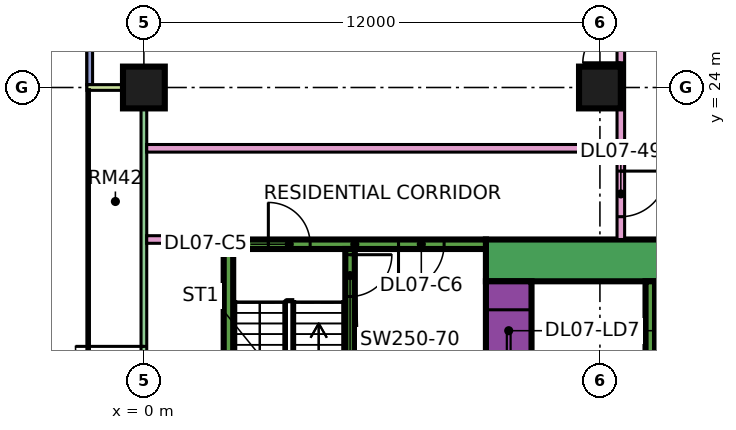
"""IFC4 building model, lengths in metres.
Left out: names, types, materials, properties, quantities, classifications, styles, units other than length and angle.
Written with IfcOpenShell. Run it as: python <this file> out.ifc"""

import sys

from ifc_helpers import new_model, si_unit, direction, frame, frame_2d, origin, origin_2d, place, context, subcontext, project, spatial, rectangle, extrude, element, fill, save


model = new_model("IFC4")
c1 = context("Model", 3, precision=1e-05, world=origin(), true_north=direction((0.0, 1.0)))
c2 = subcontext(c1, "Body", "Model", "MODEL_VIEW")
j1 = project(units=[si_unit("LENGTHUNIT", "METRE"), si_unit("PLANEANGLEUNIT", "RADIAN")], contexts=[c1])
p1 = place(None, origin())
s1 = spatial("IfcSite", under=j1, at=p1, CompositionType="ELEMENT")
p2 = place(p1, origin())
s2 = spatial("IfcBuilding", under=s1, at=p2, CompositionType="ELEMENT")
p3 = place(p2, frame((0.0, 0.0, 41.4)))
s3 = spatial("IfcBuildingStorey", under=s2, at=p3, CompositionType="ELEMENT", Elevation=41.4)
for number, where, z_axis, x_axis in (
    (1, (0.0, 24.0, 0.0), (0.0, 0.0, 1.0), (1.0, 0.0, 0.0)),
    (2, (12.0, 24.0, 0.0), (0.0, 0.0, 1.0), (1.0, 0.0, 0.0)),
):
    element("IfcColumn", number, at=place(p3, frame(where, z_axis=z_axis, x_axis=x_axis)), inside=s3, PredefinedType="COLUMN", context=c2, shape_type="SweptSolid", body=[
        extrude(rectangle(XDim=1.1, YDim=1.1, at=origin_2d()), origin(), (0.0, 0.0, 1.0), 3.75),
    ])
p4 = place(p3, frame((9.0, 19.45, 0.0), z_axis=(0.0, 0.0, 1.0), x_axis=(1.0, 0.0, 0.0)))
e3 = element("IfcWall", 3, at=p4, inside=s3, PredefinedType="SHEAR", context=c2, shape_type="SweptSolid", body=[
    extrude(rectangle(XDim=25.0, YDim=1.1, at=frame_2d((12.5, 0.0))), origin(), (0.0, 0.0, 1.0), 3.75),
])
p5 = place(p4, frame((19.1, 0.0, 0.0)))
e4 = element("IfcOpeningElement", 4, at=p5, cuts=e3, PredefinedType="OPENING", context=c2, shape_type="SweptSolid", body=[
    extrude(rectangle(XDim=1.8, YDim=2.4, at=frame_2d((0.9, 1.2))), frame((0.0, 0.56, 0.0), z_axis=(0.0, -1.0, 0.0), x_axis=(1.0, 0.0, 0.0)), (0.0, 0.0, 1.0), 1.12),
])
p6 = place(p3, frame((9.6, 8.1, 0.0), z_axis=(0.0, 0.0, 1.0), x_axis=(0.0, 1.0, 0.0)))
e5 = element("IfcWall", 5, at=p6, inside=s3, PredefinedType="SHEAR", context=c2, shape_type="SweptSolid", body=[
    extrude(rectangle(XDim=10.8, YDim=1.2, at=frame_2d((5.4, 0.0))), origin(), (0.0, 0.0, 1.0), 3.75),
])
p7 = place(p6, frame((3.775, 0.0, 0.0)))
e6 = element("IfcOpeningElement", 6, at=p7, cuts=e5, PredefinedType="OPENING", context=c2, shape_type="SweptSolid", body=[
    extrude(rectangle(XDim=1.1, YDim=2.2, at=frame_2d((0.55, 1.1))), frame((0.0, 0.61, 0.0), z_axis=(0.0, -1.0, 0.0), x_axis=(1.0, 0.0, 0.0)), (0.0, 0.0, 1.0), 1.22),
])
p8 = place(p6, frame((6.275, 0.0, 0.0)))
e7 = element("IfcOpeningElement", 7, at=p8, cuts=e5, PredefinedType="OPENING", context=c2, shape_type="SweptSolid", body=[
    extrude(rectangle(XDim=1.1, YDim=2.2, at=frame_2d((0.55, 1.1))), frame((0.0, 0.61, 0.0), z_axis=(0.0, -1.0, 0.0), x_axis=(1.0, 0.0, 0.0)), (0.0, 0.0, 1.0), 1.22),
])
p9 = place(p6, frame((8.95, 0.0, 0.0)))
e8 = element("IfcOpeningElement", 8, at=p9, cuts=e5, PredefinedType="OPENING", context=c2, shape_type="SweptSolid", body=[
    extrude(rectangle(XDim=1.1, YDim=2.2, at=frame_2d((0.55, 1.1))), frame((0.0, 0.61, 0.0), z_axis=(0.0, -1.0, 0.0), x_axis=(1.0, 0.0, 0.0)), (0.0, 0.0, 1.0), 1.22),
])
p10 = place(p6, frame((1.45, 0.0, 0.0)))
e9 = element("IfcOpeningElement", 9, at=p10, cuts=e5, PredefinedType="OPENING", context=c2, shape_type="SweptSolid", body=[
    extrude(rectangle(XDim=0.9, YDim=2.1, at=frame_2d((0.45, 1.05))), frame((0.0, 0.61, 0.0), z_axis=(0.0, -1.0, 0.0), x_axis=(1.0, 0.0, 0.0)), (0.0, 0.0, 1.0), 1.22),
])
p11 = place(p3, frame((13.325, 8.1, 0.0), z_axis=(0.0, 0.0, 1.0), x_axis=(0.0, 1.0, 0.0)))
e10 = element("IfcWall", 10, at=p11, inside=s3, PredefinedType="SHEAR", context=c2, shape_type="SweptSolid", body=[
    extrude(rectangle(XDim=10.8, YDim=0.25, at=frame_2d((5.4, 0.0))), origin(), (0.0, 0.0, 1.0), 3.75),
])
p12 = place(p3, frame((2.1, 19.875, 0.0), z_axis=(0.0, 0.0, 1.0), x_axis=(1.0, 0.0, 0.0)))
e11 = element("IfcWall", 11, at=p12, inside=s3, PredefinedType="SHEAR", context=c2, shape_type="SweptSolid", body=[
    extrude(rectangle(XDim=6.9, YDim=0.25, at=frame_2d((3.45, 0.0))), origin(), (0.0, 0.0, 1.0), 3.75),
])
p13 = place(p12, frame((1.175, 0.0, 0.0)))
e12 = element("IfcOpeningElement", 12, at=p13, cuts=e11, PredefinedType="OPENING", context=c2, shape_type="SweptSolid", body=[
    extrude(rectangle(XDim=1.1, YDim=2.2, at=frame_2d((0.55, 1.1))), frame((0.0, 0.135, 0.0), z_axis=(0.0, -1.0, 0.0), x_axis=(1.0, 0.0, 0.0)), (0.0, 0.0, 1.0), 0.27),
])
p14 = place(p12, frame((4.6, 0.0, 0.0)))
e13 = element("IfcOpeningElement", 13, at=p14, cuts=e11, PredefinedType="OPENING", context=c2, shape_type="SweptSolid", body=[
    extrude(rectangle(XDim=1.2, YDim=2.2, at=frame_2d((0.6, 1.1))), frame((0.0, 0.135, 0.0), z_axis=(0.0, -1.0, 0.0), x_axis=(1.0, 0.0, 0.0)), (0.0, 0.0, 1.0), 0.27),
])
p15 = place(p3, frame((2.225, 13.25, 0.0), z_axis=(0.0, 0.0, 1.0), x_axis=(0.0, 1.0, 0.0)))
e14 = element("IfcWall", 14, at=p15, inside=s3, PredefinedType="SHEAR", context=c2, shape_type="SweptSolid", body=[
    extrude(rectangle(XDim=6.5, YDim=0.25, at=frame_2d((3.25, 0.0))), origin(), (0.0, 0.0, 1.0), 3.75),
])
p16 = place(p3, frame((5.425, 13.25, 0.0), z_axis=(0.0, 0.0, 1.0), x_axis=(0.0, 1.0, 0.0)))
e15 = element("IfcWall", 15, at=p16, inside=s3, PredefinedType="SHEAR", context=c2, shape_type="SweptSolid", body=[
    extrude(rectangle(XDim=6.5, YDim=0.25, at=frame_2d((3.25, 0.0))), origin(), (0.0, 0.0, 1.0), 3.75),
])
p17 = place(p16, frame((5.25, 0.0, 0.0)))
e16 = element("IfcOpeningElement", 16, at=p17, cuts=e15, PredefinedType="OPENING", context=c2, shape_type="SweptSolid", body=[
    extrude(rectangle(XDim=1.1, YDim=2.2, at=frame_2d((0.55, 1.1))), frame((0.0, 0.135, 0.0), z_axis=(0.0, -1.0, 0.0), x_axis=(1.0, 0.0, 0.0)), (0.0, 0.0, 1.0), 0.27),
])
p18 = place(p3, frame((-1.425, 35.925, 0.0), z_axis=(0.0, 0.0, 1.0), x_axis=(0.0, -1.0, 0.0)))
e17 = element("IfcWall", 17, at=p18, inside=s3, PredefinedType="SOLIDWALL", context=c2, shape_type="SweptSolid", body=[
    extrude(rectangle(XDim=11.85, YDim=0.15, at=frame_2d((5.925, 0.0))), origin(), (0.0, 0.0, 1.0), 3.35),
])
p19 = place(p18, frame((0.562, 0.0, 0.45)))
e18 = element("IfcOpeningElement", 18, at=p19, cuts=e17, PredefinedType="OPENING", context=c2, shape_type="SweptSolid", body=[
    extrude(rectangle(XDim=1.8, YDim=2.4, at=frame_2d((0.9, 1.2))), frame((0.0, 0.085, 0.0), z_axis=(0.0, -1.0, 0.0), x_axis=(1.0, 0.0, 0.0)), (0.0, 0.0, 1.0), 0.17),
])
p20 = place(p18, frame((3.525, 0.0, 0.45)))
e19 = element("IfcOpeningElement", 19, at=p20, cuts=e17, PredefinedType="OPENING", context=c2, shape_type="SweptSolid", body=[
    extrude(rectangle(XDim=1.8, YDim=2.4, at=frame_2d((0.9, 1.2))), frame((0.0, 0.085, 0.0), z_axis=(0.0, -1.0, 0.0), x_axis=(1.0, 0.0, 0.0)), (0.0, 0.0, 1.0), 0.17),
])
p21 = place(p18, frame((7.387, 0.0, 0.45)))
e20 = element("IfcOpeningElement", 20, at=p21, cuts=e17, PredefinedType="OPENING", context=c2, shape_type="SweptSolid", body=[
    extrude(rectangle(XDim=3.0, YDim=2.4, at=frame_2d((1.5, 1.2))), frame((0.0, 0.085, 0.0), z_axis=(0.0, -1.0, 0.0), x_axis=(1.0, 0.0, 0.0)), (0.0, 0.0, 1.0), 0.17),
])
p22 = place(p3, frame((0.0, 23.925, 0.0), z_axis=(0.0, 0.0, 1.0), x_axis=(0.0, -1.0, 0.0)))
e21 = element("IfcWall", 21, at=p22, inside=s3, PredefinedType="SOLIDWALL", context=c2, shape_type="SweptSolid", body=[
    extrude(rectangle(XDim=11.35, YDim=0.15, at=frame_2d((5.675, 0.0))), origin(), (0.0, 0.0, 1.0), 3.35),
])
p23 = place(p22, frame((6.738, 0.0, 0.0)))
e22 = element("IfcOpeningElement", 22, at=p23, cuts=e21, PredefinedType="OPENING", context=c2, shape_type="SweptSolid", body=[
    extrude(rectangle(XDim=1.8, YDim=2.4, at=frame_2d((0.9, 1.2))), frame((0.0, 0.085, 0.0), z_axis=(0.0, -1.0, 0.0), x_axis=(1.0, 0.0, 0.0)), (0.0, 0.0, 1.0), 0.17),
])
p24 = place(p3, frame((-1.5, 24.0, 0.0), z_axis=(0.0, 0.0, 1.0), x_axis=(1.0, 0.0, 0.0)))
e23 = element("IfcWall", 23, at=p24, inside=s3, PredefinedType="SOLIDWALL", context=c2, shape_type="SweptSolid", body=[
    extrude(rectangle(XDim=1.5, YDim=0.15, at=frame_2d((0.75, 0.0))), origin(), (0.0, 0.0, 1.0), 3.35),
])
p25 = place(p3, frame((0.074, 20.0, 0.0), z_axis=(0.0, 0.0, 1.0), x_axis=(1.0, 0.0, 0.0)))
e24 = element("IfcWall", 24, at=p25, inside=s3, PredefinedType="PARTITIONING", context=c2, shape_type="SweptSolid", body=[
    extrude(rectangle(XDim=2.026, YDim=0.2, at=frame_2d((1.013, 0.0))), origin(), (0.0, 0.0, 1.0), 3.35),
])
p26 = place(p3, frame((0.074, 22.4, 0.0), z_axis=(0.0, 0.0, 1.0), x_axis=(1.0, 0.0, 0.0)))
e25 = element("IfcWall", 25, at=p26, inside=s3, PredefinedType="PARTITIONING", context=c2, shape_type="SweptSolid", body=[
    extrude(rectangle(XDim=12.376, YDim=0.2, at=frame_2d((6.188, 0.0))), origin(), (0.0, 0.0, 1.0), 3.35),
])
p27 = place(p3, frame((12.55, 20.0, 0.0), z_axis=(0.0, 0.0, 1.0), x_axis=(0.0, 1.0, 0.0)))
e26 = element("IfcWall", 26, at=p27, inside=s3, PredefinedType="PARTITIONING", context=c2, shape_type="SweptSolid", body=[
    extrude(rectangle(XDim=42.926, YDim=0.2, at=frame_2d((21.463, 0.0))), origin(), (0.0, 0.0, 1.0), 3.35),
])
p28 = place(p27, frame((25.8, 0.0, 0.0)))
e27 = element("IfcOpeningElement", 27, at=p28, cuts=e26, PredefinedType="OPENING", context=c2, shape_type="SweptSolid", body=[
    extrude(rectangle(XDim=1.0, YDim=2.1, at=frame_2d((0.5, 1.05))), frame((0.0, 0.11, 0.0), z_axis=(0.0, -1.0, 0.0), x_axis=(1.0, 0.0, 0.0)), (0.0, 0.0, 1.0), 0.22),
])
p29 = place(p27, frame((37.65, 0.0, 0.0)))
e28 = element("IfcOpeningElement", 28, at=p29, cuts=e26, PredefinedType="OPENING", context=c2, shape_type="SweptSolid", body=[
    extrude(rectangle(XDim=1.0, YDim=2.1, at=frame_2d((0.5, 1.05))), frame((0.0, 0.11, 0.0), z_axis=(0.0, -1.0, 0.0), x_axis=(1.0, 0.0, 0.0)), (0.0, 0.0, 1.0), 0.22),
])
p30 = place(p27, frame((0.6, 0.0, 0.0)))
e29 = element("IfcOpeningElement", 29, at=p30, cuts=e26, PredefinedType="OPENING", context=c2, shape_type="SweptSolid", body=[
    extrude(rectangle(XDim=1.2, YDim=2.1, at=frame_2d((0.6, 1.05))), frame((0.0, 0.11, 0.0), z_axis=(0.0, -1.0, 0.0), x_axis=(1.0, 0.0, 0.0)), (0.0, 0.0, 1.0), 0.22),
])
p31 = place(p27, frame((4.65, 0.0, 0.0)))
e30 = element("IfcOpeningElement", 30, at=p31, cuts=e26, PredefinedType="OPENING", context=c2, shape_type="SweptSolid", body=[
    extrude(rectangle(XDim=1.0, YDim=2.1, at=frame_2d((0.5, 1.05))), frame((0.0, 0.11, 0.0), z_axis=(0.0, -1.0, 0.0), x_axis=(1.0, 0.0, 0.0)), (0.0, 0.0, 1.0), 0.22),
])
p32 = place(p23, frame((1.8, 0.0, 0.0), z_axis=(0.0, 0.0, 1.0), x_axis=(-1.0, 0.0, 0.0)))
e31 = element("IfcDoor", 31, at=p32, inside=s3, OperationType="DOUBLE_DOOR_SINGLE_SWING", PredefinedType="DOOR", context=c2, shape_type="SweptSolid", body=[
    extrude(rectangle(XDim=1.8, YDim=2.4, at=frame_2d((0.9, 1.2))), frame((0.0, 0.025, 0.0), z_axis=(0.0, -1.0, 0.0), x_axis=(1.0, 0.0, 0.0)), (0.0, 0.0, 1.0), 0.05),
])
fill(e22, e31)
p33 = place(p9, origin())
e32 = element("IfcDoor", 32, at=p33, inside=s3, OperationType="DOUBLE_DOOR_SLIDING", PredefinedType="DOOR", context=c2, shape_type="SweptSolid", body=[
    extrude(rectangle(XDim=1.1, YDim=2.2, at=frame_2d((0.55, 1.1))), frame((0.0, 0.025, 0.0), z_axis=(0.0, -1.0, 0.0), x_axis=(1.0, 0.0, 0.0)), (0.0, 0.0, 1.0), 0.05),
])
fill(e8, e32)
p34 = place(p17, origin())
e33 = element("IfcDoor", 33, at=p34, inside=s3, OperationType="SINGLE_SWING_RIGHT", PredefinedType="DOOR", context=c2, shape_type="SweptSolid", body=[
    extrude(rectangle(XDim=1.1, YDim=2.2, at=frame_2d((0.55, 1.1))), frame((0.0, 0.025, 0.0), z_axis=(0.0, -1.0, 0.0), x_axis=(1.0, 0.0, 0.0)), (0.0, 0.0, 1.0), 0.05),
])
fill(e16, e33)
p35 = place(p13, origin())
e34 = element("IfcDoor", 34, at=p35, inside=s3, OperationType="SINGLE_SWING_LEFT", PredefinedType="DOOR", context=c2, shape_type="SweptSolid", body=[
    extrude(rectangle(XDim=1.1, YDim=2.2, at=frame_2d((0.55, 1.1))), frame((0.0, 0.025, 0.0), z_axis=(0.0, -1.0, 0.0), x_axis=(1.0, 0.0, 0.0)), (0.0, 0.0, 1.0), 0.05),
])
fill(e12, e34)
p36 = place(p14, frame((1.2, 0.0, 0.0), z_axis=(0.0, 0.0, 1.0), x_axis=(-1.0, 0.0, 0.0)))
e35 = element("IfcDoor", 35, at=p36, inside=s3, OperationType="SINGLE_SWING_LEFT", PredefinedType="DOOR", context=c2, shape_type="SweptSolid", body=[
    extrude(rectangle(XDim=1.2, YDim=2.2, at=frame_2d((0.6, 1.1))), frame((0.0, 0.025, 0.0), z_axis=(0.0, -1.0, 0.0), x_axis=(1.0, 0.0, 0.0)), (0.0, 0.0, 1.0), 0.05),
])
fill(e13, e35)
p37 = place(p30, origin())
e36 = element("IfcDoor", 36, at=p37, inside=s3, OperationType="SINGLE_SWING_RIGHT", PredefinedType="DOOR", context=c2, shape_type="SweptSolid", body=[
    extrude(rectangle(XDim=1.2, YDim=2.1, at=frame_2d((0.6, 1.05))), frame((0.0, 0.025, 0.0), z_axis=(0.0, -1.0, 0.0), x_axis=(1.0, 0.0, 0.0)), (0.0, 0.0, 1.0), 0.05),
])
fill(e29, e36)
p38 = place(p31, origin())
e37 = element("IfcDoor", 37, at=p38, inside=s3, OperationType="SINGLE_SWING_LEFT", PredefinedType="DOOR", context=c2, shape_type="SweptSolid", body=[
    extrude(rectangle(XDim=1.0, YDim=2.1, at=frame_2d((0.5, 1.05))), frame((0.0, 0.025, 0.0), z_axis=(0.0, -1.0, 0.0), x_axis=(1.0, 0.0, 0.0)), (0.0, 0.0, 1.0), 0.05),
])
fill(e30, e37)
save(model, sys.argv[1])
